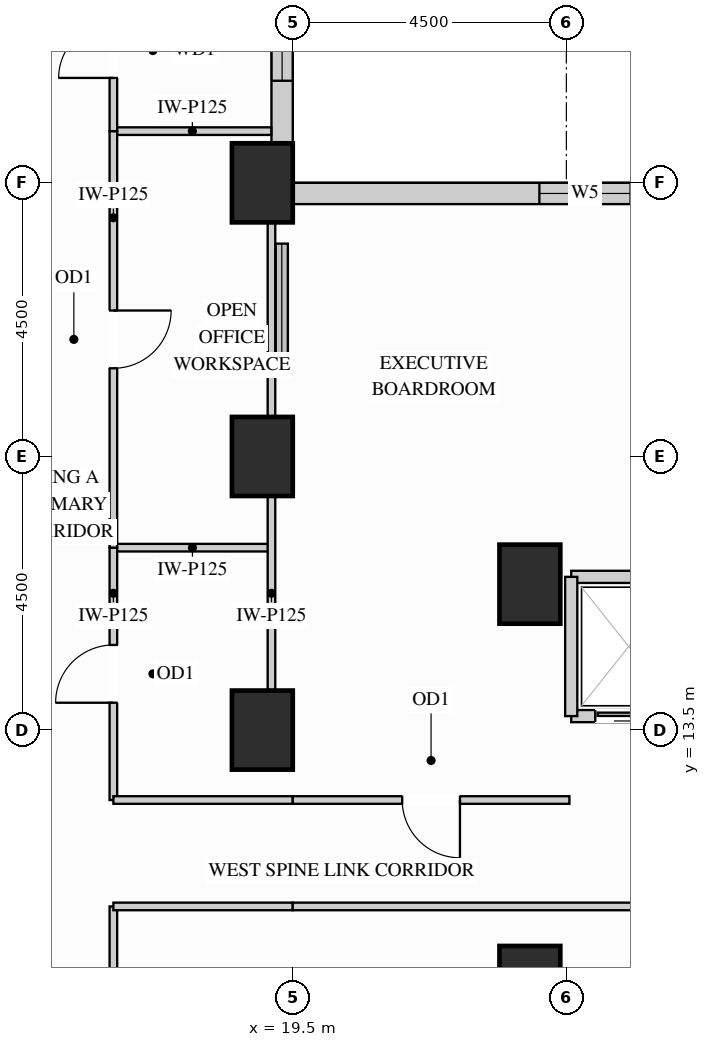
"""IFC4 building model, lengths in metres.
Left out: names, types, materials, properties, quantities, classifications, styles, units other than length and angle.
Written with IfcOpenShell. Run it as: python <this file> out.ifc"""

import sys

from ifc_helpers import new_model, si_unit, direction, frame, frame_2d, origin, origin_2d, place, context, subcontext, project, spatial, rectangle, extrude, source, transform, mapped, element, fill, save


model = new_model("IFC4")
c1 = context("Model", 3, precision=1e-05, world=origin(), true_north=direction((0.0, 1.0)))
c2 = subcontext(c1, "Body", "Model", "MODEL_VIEW")
j1 = project(units=[si_unit("LENGTHUNIT", "METRE"), si_unit("PLANEANGLEUNIT", "RADIAN")], contexts=[c1])
p1 = place(None, origin())
s1 = spatial("IfcSite", under=j1, at=p1, CompositionType="ELEMENT")
p2 = place(p1, origin())
s2 = spatial("IfcBuilding", under=s1, at=p2, CompositionType="ELEMENT")
p3 = place(p2, frame((0.0, 0.0, 22.5)))
s3 = spatial("IfcBuildingStorey", under=s2, at=p3, CompositionType="ELEMENT", Elevation=22.5)
m1 = source(origin(), c2, "Body", "SweptSolid", [
    extrude(rectangle(XDim=1.0, YDim=1.3, at=origin_2d()), origin(), (0.0, 0.0, 1.0), 3.38),
])
for number, where, z_axis, x_axis in (
    (1, (19.0, 13.5, 0.0), (0.0, 0.0, 1.0), (1.0, 0.0, 0.0)),
    (2, (19.0, 18.0, 0.0), (0.0, 0.0, 1.0), (1.0, 0.0, 0.0)),
    (3, (19.0, 22.5, 0.0), (0.0, 0.0, 1.0), (1.0, 0.0, 0.0)),
    (4, (23.4, 15.9, 0.0), (0.0, 0.0, 1.0), (1.0, 0.0, 0.0)),
    (5, (23.4, 9.3, 0.0), (0.0, 0.0, 1.0), (1.0, 0.0, 0.0)),
):
    element("IfcColumn", number, at=place(p3, frame(where, z_axis=z_axis, x_axis=x_axis)), inside=s3, PredefinedType="COLUMN", context=c2, shape_type="MappedRepresentation", body=[
        mapped(m1, transform((0.0, 0.0, 0.0), x_axis=(1.0, 0.0, 0.0), y_axis=(0.0, 1.0, 0.0), z_axis=(0.0, 0.0, 1.0))),
    ])
p4 = place(p3, frame((34.352, 22.325, 0.0), z_axis=(0.0, 0.0, 1.0), x_axis=(-1.0, 0.0, 0.0)))
e6 = element("IfcWall", 6, at=p4, inside=s3, PredefinedType="SOLIDWALL", context=c2, shape_type="SweptSolid", body=[
    extrude(rectangle(XDim=14.854, YDim=0.35, at=frame_2d((7.427, 0.0))), origin(), (0.0, 0.0, 1.0), 3.365),
])
p5 = place(p4, frame((4.058, 0.0, 0.78)))
e7 = element("IfcOpeningElement", 7, at=p5, cuts=e6, PredefinedType="OPENING", context=c2, shape_type="SweptSolid", body=[
    extrude(rectangle(XDim=1.5, YDim=2.0, at=frame_2d((0.75, 1.0))), frame((0.0, 0.185, 0.0), z_axis=(0.0, -1.0, 0.0), x_axis=(1.0, 0.0, 0.0)), (0.0, 0.0, 1.0), 0.37),
])
p6 = place(p4, frame((9.296, 0.0, 0.78)))
e8 = element("IfcOpeningElement", 8, at=p6, cuts=e6, PredefinedType="OPENING", context=c2, shape_type="SweptSolid", body=[
    extrude(rectangle(XDim=1.5, YDim=2.0, at=frame_2d((0.75, 1.0))), frame((0.0, 0.185, 0.0), z_axis=(0.0, -1.0, 0.0), x_axis=(1.0, 0.0, 0.0)), (0.0, 0.0, 1.0), 0.37),
])
p7 = place(p3, frame((19.325, 23.148, 0.0), z_axis=(0.0, 0.0, 1.0), x_axis=(0.0, 1.0, 0.0)))
e9 = element("IfcWall", 9, at=p7, inside=s3, PredefinedType="SOLIDWALL", context=c2, shape_type="SweptSolid", body=[
    extrude(rectangle(XDim=3.004, YDim=0.35, at=frame_2d((1.502, 0.0))), origin(), (0.0, 0.0, 1.0), 2.51),
])
p8 = place(p7, frame((1.031, 0.0, 0.78)))
e10 = element("IfcOpeningElement", 10, at=p8, cuts=e9, PredefinedType="OPENING", context=c2, shape_type="SweptSolid", body=[
    extrude(rectangle(XDim=1.5, YDim=1.55, at=frame_2d((0.75, 0.775))), frame((0.0, 0.185, 0.0), z_axis=(0.0, -1.0, 0.0), x_axis=(1.0, 0.0, 0.0)), (0.0, 0.0, 1.0), 0.37),
])
m2 = source(origin(), c2, "Body", "SweptSolid", [
    extrude(rectangle(XDim=2.6, YDim=0.125, at=frame_2d((1.3, 0.0))), origin(), (0.0, 0.0, 1.0), 2.896),
])
p9 = place(p3, frame((16.55, 16.5, 0.0), z_axis=(0.0, 0.0, 1.0), x_axis=(1.0, 0.0, 0.0)))
e11 = element("IfcWall", 11, at=p9, inside=s3, PredefinedType="PARTITIONING", context=c2, shape_type="MappedRepresentation", body=[
    mapped(m2, transform((0.0, 0.0, 0.0), x_axis=(1.0, 0.0, 0.0), y_axis=(0.0, 1.0, 0.0), z_axis=(0.0, 0.0, 1.0))),
])
m3 = source(origin(), c2, "Body", "SweptSolid", [
    extrude(rectangle(XDim=2.598, YDim=0.125, at=frame_2d((1.299, 0.0))), origin(), (0.0, 0.0, 1.0), 3.365),
])
p10 = place(p3, frame((16.55, 23.35, 0.0), z_axis=(0.0, 0.0, 1.0), x_axis=(1.0, 0.0, 0.0)))
e12 = element("IfcWall", 12, at=p10, inside=s3, PredefinedType="PARTITIONING", context=c2, shape_type="MappedRepresentation", body=[
    mapped(m3, transform((0.0, 0.0, 0.0), x_axis=(1.0, 0.0, 0.0), y_axis=(0.0, 1.0, 0.0), z_axis=(0.0, 0.0, 1.0))),
])
m4 = source(origin(), c2, "Body", "SweptSolid", [
    extrude(rectangle(XDim=3.18, YDim=0.125, at=frame_2d((1.59, 0.0))), origin(), (0.0, 0.0, 1.0), 2.67),
])
for number, where, z_axis, x_axis in (
    (13, (19.15, 14.16, 0.0), (0.0, 0.0, 1.0), (0.0, 1.0, 0.0)),
    (14, (19.15, 18.66, 0.0), (0.0, 0.0, 1.0), (0.0, 1.0, 0.0)),
):
    element("IfcWall", number, at=place(p3, frame(where, z_axis=z_axis, x_axis=x_axis)), inside=s3, PredefinedType="PARTITIONING", context=c2, shape_type="MappedRepresentation", body=[
        mapped(m4, transform((0.0, 0.0, 0.0), x_axis=(1.0, 0.0, 0.0), y_axis=(0.0, 1.0, 0.0), z_axis=(0.0, 0.0, 1.0))),
    ])
p11 = place(p3, frame((16.55, 12.35, 0.0), z_axis=(0.0, 0.0, 1.0), x_axis=(0.0, 1.0, 0.0)))
e15 = element("IfcWall", 15, at=p11, inside=s3, PredefinedType="PARTITIONING", context=c2, shape_type="SweptSolid", body=[
    extrude(rectangle(XDim=4.15, YDim=0.125, at=frame_2d((2.075, 0.0))), origin(), (0.0, 0.0, 1.0), 3.365),
])
p12 = place(p11, frame((1.6, 0.0, 0.0)))
e16 = element("IfcOpeningElement", 16, at=p12, cuts=e15, PredefinedType="OPENING", context=c2, shape_type="SweptSolid", body=[
    extrude(rectangle(XDim=0.95, YDim=2.15, at=frame_2d((0.475, 1.075))), frame((0.0, 0.073, 0.0), z_axis=(0.0, -1.0, 0.0), x_axis=(1.0, 0.0, 0.0)), (0.0, 0.0, 1.0), 0.145),
])
p13 = place(p3, frame((16.55, 16.5, 0.0), z_axis=(0.0, 0.0, 1.0), x_axis=(0.0, 1.0, 0.0)))
e17 = element("IfcWall", 17, at=p13, inside=s3, PredefinedType="PARTITIONING", context=c2, shape_type="SweptSolid", body=[
    extrude(rectangle(XDim=6.85, YDim=0.125, at=frame_2d((3.425, 0.0))), origin(), (0.0, 0.0, 1.0), 3.365),
])
p14 = place(p13, frame((2.95, 0.0, 0.0)))
e18 = element("IfcOpeningElement", 18, at=p14, cuts=e17, PredefinedType="OPENING", context=c2, shape_type="SweptSolid", body=[
    extrude(rectangle(XDim=0.95, YDim=2.15, at=frame_2d((0.475, 1.075))), frame((0.0, 0.073, 0.0), z_axis=(0.0, -1.0, 0.0), x_axis=(1.0, 0.0, 0.0)), (0.0, 0.0, 1.0), 0.145),
])
p15 = place(p3, frame((16.55, 4.65, 0.0), z_axis=(0.0, 0.0, 1.0), x_axis=(0.0, 1.0, 0.0)))
e19 = element("IfcWall", 19, at=p15, inside=s3, PredefinedType="PARTITIONING", context=c2, shape_type="SweptSolid", body=[
    extrude(rectangle(XDim=5.95, YDim=0.125, at=frame_2d((2.975, 0.0))), origin(), (0.0, 0.0, 1.0), 3.365),
])
p16 = place(p15, frame((2.5, 0.0, 0.0)))
e20 = element("IfcOpeningElement", 20, at=p16, cuts=e19, PredefinedType="OPENING", context=c2, shape_type="SweptSolid", body=[
    extrude(rectangle(XDim=0.95, YDim=2.15, at=frame_2d((0.475, 1.075))), frame((0.0, 0.073, 0.0), z_axis=(0.0, -1.0, 0.0), x_axis=(1.0, 0.0, 0.0)), (0.0, 0.0, 1.0), 0.145),
])
p17 = place(p3, frame((16.55, 23.35, 0.0), z_axis=(0.0, 0.0, 1.0), x_axis=(0.0, 1.0, 0.0)))
e21 = element("IfcWall", 21, at=p17, inside=s3, PredefinedType="PARTITIONING", context=c2, shape_type="SweptSolid", body=[
    extrude(rectangle(XDim=2.7, YDim=0.125, at=frame_2d((1.35, 0.0))), origin(), (0.0, 0.0, 1.0), 3.365),
])
p18 = place(p17, frame((0.875, 0.0, 0.0)))
e22 = element("IfcOpeningElement", 22, at=p18, cuts=e21, PredefinedType="OPENING", context=c2, shape_type="SweptSolid", body=[
    extrude(rectangle(XDim=0.9, YDim=2.15, at=frame_2d((0.45, 1.075))), frame((0.0, 0.073, 0.0), z_axis=(0.0, -1.0, 0.0), x_axis=(1.0, 0.0, 0.0)), (0.0, 0.0, 1.0), 0.145),
])
m5 = source(origin(), c2, "Body", "SweptSolid", [
    extrude(rectangle(XDim=2.95, YDim=0.125, at=frame_2d((1.475, 0.0))), origin(), (0.0, 0.0, 1.0), 3.365),
])
p19 = place(p3, frame((16.55, 12.35, 0.0), z_axis=(0.0, 0.0, 1.0), x_axis=(1.0, 0.0, 0.0)))
e23 = element("IfcWall", 23, at=p19, inside=s3, PredefinedType="PARTITIONING", context=c2, shape_type="MappedRepresentation", body=[
    mapped(m5, transform((0.0, 0.0, 0.0), x_axis=(1.0, 0.0, 0.0), y_axis=(0.0, 1.0, 0.0), z_axis=(0.0, 0.0, 1.0))),
])
p20 = place(p3, frame((19.5, 12.35, 0.0), z_axis=(0.0, 0.0, 1.0), x_axis=(1.0, 0.0, 0.0)))
e24 = element("IfcWall", 24, at=p20, inside=s3, PredefinedType="PARTITIONING", context=c2, shape_type="SweptSolid", body=[
    extrude(rectangle(XDim=4.55, YDim=0.125, at=frame_2d((2.275, 0.0))), origin(), (0.0, 0.0, 1.0), 3.365),
])
p21 = place(p20, frame((1.8, 0.0, 0.0)))
e25 = element("IfcOpeningElement", 25, at=p21, cuts=e24, PredefinedType="OPENING", context=c2, shape_type="SweptSolid", body=[
    extrude(rectangle(XDim=0.95, YDim=2.15, at=frame_2d((0.475, 1.075))), frame((0.0, 0.073, 0.0), z_axis=(0.0, -1.0, 0.0), x_axis=(1.0, 0.0, 0.0)), (0.0, 0.0, 1.0), 0.145),
])
p22 = place(p3, frame((16.55, 10.6, 0.0), z_axis=(0.0, 0.0, 1.0), x_axis=(1.0, 0.0, 0.0)))
e26 = element("IfcWall", 26, at=p22, inside=s3, PredefinedType="PARTITIONING", context=c2, shape_type="MappedRepresentation", body=[
    mapped(m5, transform((0.0, 0.0, 0.0), x_axis=(1.0, 0.0, 0.0), y_axis=(0.0, 1.0, 0.0), z_axis=(0.0, 0.0, 1.0))),
])
p23 = place(p3, frame((19.5, 10.6, 0.0), z_axis=(0.0, 0.0, 1.0), x_axis=(1.0, 0.0, 0.0)))
e27 = element("IfcWall", 27, at=p23, inside=s3, PredefinedType="PARTITIONING", context=c2, shape_type="SweptSolid", body=[
    extrude(rectangle(XDim=14.9, YDim=0.125, at=frame_2d((7.45, 0.0))), origin(), (0.0, 0.0, 1.0), 3.365),
])
p24 = place(p23, frame((6.975, 0.0, 0.0)))
e28 = element("IfcOpeningElement", 28, at=p24, cuts=e27, PredefinedType="OPENING", context=c2, shape_type="SweptSolid", body=[
    extrude(rectangle(XDim=0.95, YDim=2.15, at=frame_2d((0.475, 1.075))), frame((0.0, 0.073, 0.0), z_axis=(0.0, -1.0, 0.0), x_axis=(1.0, 0.0, 0.0)), (0.0, 0.0, 1.0), 0.145),
])
m6 = source(origin(), c2, "Body", "SweptSolid", [
    extrude(rectangle(XDim=1.89, YDim=0.2, at=frame_2d((0.945, 0.0))), origin(), (0.0, 0.0, 1.0), 2.67),
])
p25 = place(p3, frame((24.08, 16.02, 0.0), z_axis=(0.0, 0.0, 1.0), x_axis=(1.0, 0.0, 0.0)))
e29 = element("IfcWall", 29, at=p25, inside=s3, PredefinedType="PARTITIONING", context=c2, shape_type="MappedRepresentation", body=[
    mapped(m6, transform((0.0, 0.0, 0.0), x_axis=(1.0, 0.0, 0.0), y_axis=(0.0, 1.0, 0.0), z_axis=(0.0, 0.0, 1.0))),
])
p26 = place(p3, frame((24.08, 13.73, 0.0), z_axis=(0.0, 0.0, 1.0), x_axis=(1.0, 0.0, 0.0)))
e30 = element("IfcWall", 30, at=p26, inside=s3, PredefinedType="PARTITIONING", context=c2, shape_type="SweptSolid", body=[
    extrude(rectangle(XDim=1.89, YDim=0.2, at=frame_2d((0.945, 0.0))), origin(), (0.0, 0.0, 1.0), 2.446),
])
p27 = place(p26, frame((0.395, 0.0, 0.0)))
e31 = element("IfcOpeningElement", 31, at=p27, cuts=e30, PredefinedType="OPENING", context=c2, shape_type="SweptSolid", body=[
    extrude(rectangle(XDim=1.1, YDim=2.2, at=frame_2d((0.55, 1.1))), frame((0.0, 0.11, 0.0), z_axis=(0.0, -1.0, 0.0), x_axis=(1.0, 0.0, 0.0)), (0.0, 0.0, 1.0), 0.22),
])
m7 = source(origin(), c2, "Body", "SweptSolid", [
    extrude(rectangle(XDim=2.29, YDim=0.2, at=frame_2d((1.145, 0.0))), origin(), (0.0, 0.0, 1.0), 3.365),
])
p28 = place(p3, frame((24.08, 13.73, 0.0), z_axis=(0.0, 0.0, 1.0), x_axis=(0.0, 1.0, 0.0)))
e32 = element("IfcWall", 32, at=p28, inside=s3, PredefinedType="PARTITIONING", context=c2, shape_type="MappedRepresentation", body=[
    mapped(m7, transform((0.0, 0.0, 0.0), x_axis=(1.0, 0.0, 0.0), y_axis=(0.0, 1.0, 0.0), z_axis=(0.0, 0.0, 1.0))),
])
m8 = source(origin(), c2, "Body", "SweptSolid", [
    extrude(rectangle(XDim=1.1, YDim=2.2, at=frame_2d((0.55, 1.1))), frame((0.0, 0.025, 0.0), z_axis=(0.0, -1.0, 0.0), x_axis=(1.0, 0.0, 0.0)), (0.0, 0.0, 1.0), 0.05),
])
p29 = place(p27, origin())
e33 = element("IfcDoor", 33, at=p29, inside=s3, OperationType="SLIDING_TO_LEFT", PredefinedType="DOOR", context=c2, shape_type="MappedRepresentation", body=[
    mapped(m8, transform((0.0, 0.0, 0.0), x_axis=(1.0, 0.0, 0.0), y_axis=(0.0, 1.0, 0.0), z_axis=(0.0, 0.0, 1.0))),
])
fill(e31, e33)
m9 = source(origin(), c2, "Body", "SweptSolid", [
    extrude(rectangle(XDim=0.95, YDim=2.15, at=frame_2d((0.475, 1.075))), frame((0.0, 0.025, 0.0), z_axis=(0.0, -1.0, 0.0), x_axis=(1.0, 0.0, 0.0)), (0.0, 0.0, 1.0), 0.05),
])
p30 = place(p12, origin())
e34 = element("IfcDoor", 34, at=p30, inside=s3, OperationType="SINGLE_SWING_LEFT", PredefinedType="DOOR", context=c2, shape_type="MappedRepresentation", body=[
    mapped(m9, transform((0.0, 0.0, 0.0), x_axis=(1.0, 0.0, 0.0), y_axis=(0.0, 1.0, 0.0), z_axis=(0.0, 0.0, 1.0))),
])
fill(e16, e34)
p31 = place(p14, origin())
e35 = element("IfcDoor", 35, at=p31, inside=s3, OperationType="SINGLE_SWING_RIGHT", PredefinedType="DOOR", context=c2, shape_type="MappedRepresentation", body=[
    mapped(m9, transform((0.0, 0.0, 0.0), x_axis=(1.0, 0.0, 0.0), y_axis=(0.0, 1.0, 0.0), z_axis=(0.0, 0.0, 1.0))),
])
fill(e18, e35)
p32 = place(p21, origin())
e36 = element("IfcDoor", 36, at=p32, inside=s3, OperationType="SINGLE_SWING_RIGHT", PredefinedType="DOOR", context=c2, shape_type="MappedRepresentation", body=[
    mapped(m9, transform((0.0, 0.0, 0.0), x_axis=(1.0, 0.0, 0.0), y_axis=(0.0, 1.0, 0.0), z_axis=(0.0, 0.0, 1.0))),
])
fill(e25, e36)
m10 = source(origin(), c2, "Body", "SweptSolid", [
    extrude(rectangle(XDim=0.9, YDim=2.15, at=frame_2d((0.45, 1.075))), frame((0.0, 0.025, 0.0), z_axis=(0.0, -1.0, 0.0), x_axis=(1.0, 0.0, 0.0)), (0.0, 0.0, 1.0), 0.05),
])
p33 = place(p18, origin())
e37 = element("IfcDoor", 37, at=p33, inside=s3, OperationType="SINGLE_SWING_LEFT", PredefinedType="DOOR", context=c2, shape_type="MappedRepresentation", body=[
    mapped(m10, transform((0.0, 0.0, 0.0), x_axis=(1.0, 0.0, 0.0), y_axis=(0.0, 1.0, 0.0), z_axis=(0.0, 0.0, 1.0))),
])
fill(e22, e37)
m11 = source(origin(), c2, "Body", "SweptSolid", [
    extrude(rectangle(XDim=1.5, YDim=2.0, at=frame_2d((0.75, 1.0))), frame((0.0, 0.03, 0.0), z_axis=(0.0, -1.0, 0.0), x_axis=(1.0, 0.0, 0.0)), (0.0, 0.0, 1.0), 0.06),
])
p34 = place(p6, origin())
e38 = element("IfcWindow", 38, at=p34, inside=s3, PartitioningType="SINGLE_PANEL", PredefinedType="WINDOW", context=c2, shape_type="MappedRepresentation", body=[
    mapped(m11, transform((0.0, 0.0, 0.0), x_axis=(1.0, 0.0, 0.0), y_axis=(0.0, 1.0, 0.0), z_axis=(0.0, 0.0, 1.0))),
])
fill(e8, e38)
m12 = source(origin(), c2, "Body", "SweptSolid", [
    extrude(rectangle(XDim=1.5, YDim=1.55, at=frame_2d((0.75, 0.775))), frame((0.0, 0.03, 0.0), z_axis=(0.0, -1.0, 0.0), x_axis=(1.0, 0.0, 0.0)), (0.0, 0.0, 1.0), 0.06),
])
p35 = place(p8, origin())
e39 = element("IfcWindow", 39, at=p35, inside=s3, PartitioningType="SINGLE_PANEL", PredefinedType="WINDOW", context=c2, shape_type="MappedRepresentation", body=[
    mapped(m12, transform((0.0, 0.0, 0.0), x_axis=(1.0, 0.0, 0.0), y_axis=(0.0, 1.0, 0.0), z_axis=(0.0, 0.0, 1.0))),
])
fill(e10, e39)
save(model, sys.argv[1])
